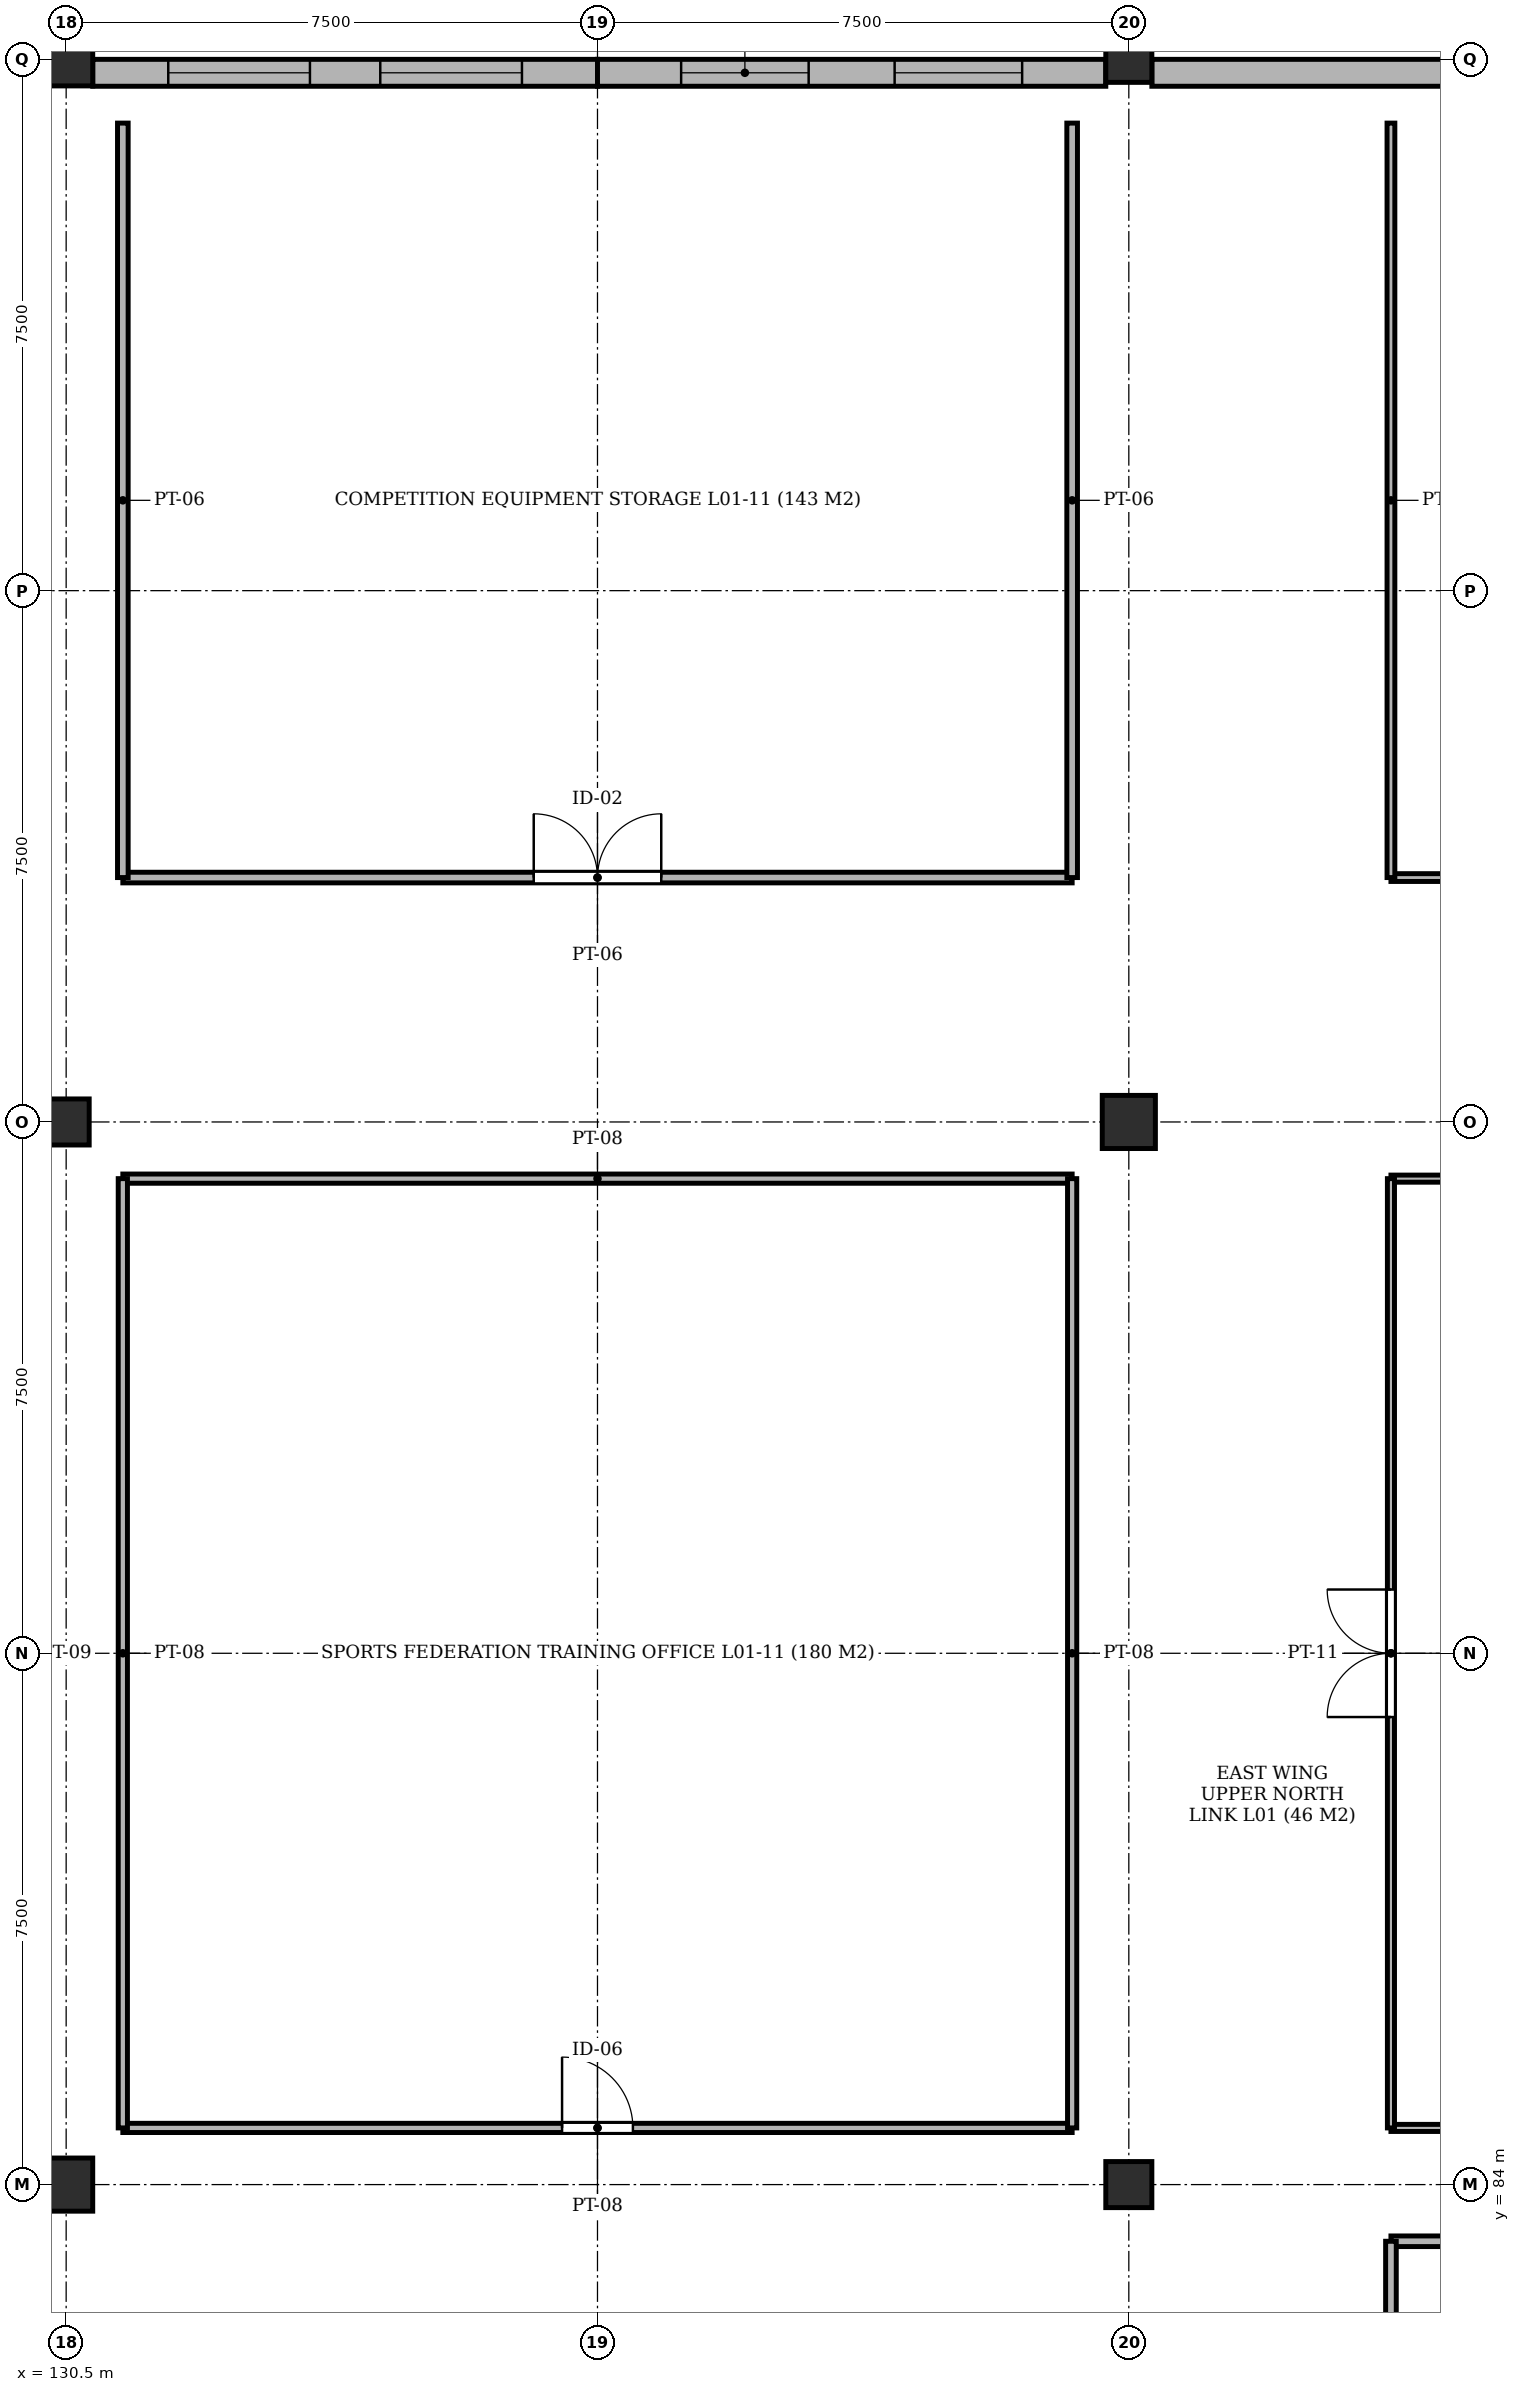
"""IFC4 building model, lengths in metres.
Left out: names, types, materials, properties, quantities, classifications, styles, units other than length and angle.
Written with IfcOpenShell. Run it as: python <this file> out.ifc"""

import sys

from ifc_helpers import new_model, si_unit, direction, frame, frame_2d, origin, origin_2d, place, context, subcontext, project, spatial, rectangle, extrude, element, fill, save


model = new_model("IFC4")
c1 = context("Model", 3, precision=1e-05, world=origin(), true_north=direction((0.0, 1.0)))
c2 = subcontext(c1, "Body", "Model", "MODEL_VIEW")
j1 = project(units=[si_unit("LENGTHUNIT", "METRE"), si_unit("PLANEANGLEUNIT", "RADIAN")], contexts=[c1])
p1 = place(None, origin())
s1 = spatial("IfcSite", under=j1, at=p1, CompositionType="ELEMENT")
p2 = place(p1, origin())
s2 = spatial("IfcBuilding", under=s1, at=p2, CompositionType="ELEMENT")
p3 = place(p2, frame((0.0, 0.0, 4.6)))
s3 = spatial("IfcBuildingStorey", under=s2, at=p3, CompositionType="ELEMENT", Elevation=4.6)
p4 = place(p3, frame((130.5, 84.0, -0.3), z_axis=(0.0, 0.0, 1.0), x_axis=(1.0, 0.0, 0.0)))
e1 = element("IfcColumn", 1, at=p4, inside=s3, PredefinedType="COLUMN", context=c2, shape_type="SweptSolid", body=[
    extrude(rectangle(XDim=0.75, YDim=0.75, at=origin_2d()), origin(), (0.0, 0.0, 1.0), 4.65),
])
p5 = place(p3, frame((130.5, 99.0, -0.3), z_axis=(0.0, 0.0, 1.0), x_axis=(1.0, 0.0, 0.0)))
e2 = element("IfcColumn", 2, at=p5, inside=s3, PredefinedType="COLUMN", context=c2, shape_type="SweptSolid", body=[
    extrude(rectangle(XDim=0.65, YDim=0.65, at=origin_2d()), origin(), (0.0, 0.0, 1.0), 4.65),
])
p6 = place(p3, frame((130.5, 114.0, -0.3), z_axis=(0.0, 0.0, 1.0), x_axis=(1.0, 0.0, 0.0)))
e3 = element("IfcColumn", 3, at=p6, inside=s3, PredefinedType="COLUMN", context=c2, shape_type="SweptSolid", body=[
    extrude(rectangle(XDim=0.75, YDim=0.75, at=origin_2d()), origin(), (0.0, 0.0, 1.0), 4.65),
])
p7 = place(p3, frame((145.5, 84.0, -0.3), z_axis=(0.0, 0.0, 1.0), x_axis=(1.0, 0.0, 0.0)))
e4 = element("IfcColumn", 4, at=p7, inside=s3, PredefinedType="COLUMN", context=c2, shape_type="SweptSolid", body=[
    extrude(rectangle(XDim=0.65, YDim=0.65, at=origin_2d()), origin(), (0.0, 0.0, 1.0), 4.65),
])
p8 = place(p3, frame((145.5, 99.0, -0.3), z_axis=(0.0, 0.0, 1.0), x_axis=(1.0, 0.0, 0.0)))
e5 = element("IfcColumn", 5, at=p8, inside=s3, PredefinedType="COLUMN", context=c2, shape_type="SweptSolid", body=[
    extrude(rectangle(XDim=0.75, YDim=0.75, at=origin_2d()), origin(), (0.0, 0.0, 1.0), 4.65),
])
p9 = place(p3, frame((145.5, 114.0, -0.3), z_axis=(0.0, 0.0, 1.0), x_axis=(1.0, 0.0, 0.0)))
e6 = element("IfcColumn", 6, at=p9, inside=s3, PredefinedType="COLUMN", context=c2, shape_type="SweptSolid", body=[
    extrude(rectangle(XDim=0.65, YDim=0.65, at=origin_2d()), origin(), (0.0, 0.0, 1.0), 4.65),
])
p10 = place(p3, frame((138.0, 113.81, 0.0), z_axis=(0.0, 0.0, 1.0), x_axis=(-1.0, 0.0, 0.0)))
e7 = element("IfcWall", 7, at=p10, inside=s3, PredefinedType="SOLIDWALL", context=c2, shape_type="SweptSolid", body=[
    extrude(rectangle(XDim=7.125, YDim=0.38, at=frame_2d((3.562, 0.0))), origin(), (0.0, 0.0, 1.0), 3.65),
])
p11 = place(p10, frame((4.059, 0.0, 0.92)))
e8 = element("IfcOpeningElement", 8, at=p11, cuts=e7, PredefinedType="OPENING", context=c2, shape_type="SweptSolid", body=[
    extrude(rectangle(XDim=2.0, YDim=2.3, at=frame_2d((1.0, 1.15))), frame((0.0, 0.202, 0.0), z_axis=(0.0, -1.0, 0.0), x_axis=(1.0, 0.0, 0.0)), (0.0, 0.0, 1.0), 0.404),
])
p12 = place(p10, frame((1.066, 0.0, 0.92)))
e9 = element("IfcOpeningElement", 9, at=p12, cuts=e7, PredefinedType="OPENING", context=c2, shape_type="SweptSolid", body=[
    extrude(rectangle(XDim=2.0, YDim=2.3, at=frame_2d((1.0, 1.15))), frame((0.0, 0.202, 0.0), z_axis=(0.0, -1.0, 0.0), x_axis=(1.0, 0.0, 0.0)), (0.0, 0.0, 1.0), 0.404),
])
p13 = place(p3, frame((145.175, 113.81, 0.0), z_axis=(0.0, 0.0, 1.0), x_axis=(-1.0, 0.0, 0.0)))
e10 = element("IfcWall", 10, at=p13, inside=s3, PredefinedType="SOLIDWALL", context=c2, shape_type="SweptSolid", body=[
    extrude(rectangle(XDim=7.175, YDim=0.38, at=frame_2d((3.587, 0.0))), origin(), (0.0, 0.0, 1.0), 3.65),
])
p14 = place(p13, frame((4.194, 0.0, 0.92)))
e11 = element("IfcOpeningElement", 11, at=p14, cuts=e10, PredefinedType="OPENING", context=c2, shape_type="SweptSolid", body=[
    extrude(rectangle(XDim=1.8, YDim=2.3, at=frame_2d((0.9, 1.15))), frame((0.0, 0.202, 0.0), z_axis=(0.0, -1.0, 0.0), x_axis=(1.0, 0.0, 0.0)), (0.0, 0.0, 1.0), 0.404),
])
p15 = place(p13, frame((1.181, 0.0, 0.92)))
e12 = element("IfcOpeningElement", 12, at=p15, cuts=e10, PredefinedType="OPENING", context=c2, shape_type="SweptSolid", body=[
    extrude(rectangle(XDim=1.8, YDim=2.3, at=frame_2d((0.9, 1.15))), frame((0.0, 0.202, 0.0), z_axis=(0.0, -1.0, 0.0), x_axis=(1.0, 0.0, 0.0)), (0.0, 0.0, 1.0), 0.404),
])
p16 = place(p3, frame((153.0, 113.81, 0.0), z_axis=(0.0, 0.0, 1.0), x_axis=(-1.0, 0.0, 0.0)))
e13 = element("IfcWall", 13, at=p16, inside=s3, PredefinedType="SOLIDWALL", context=c2, shape_type="SweptSolid", body=[
    extrude(rectangle(XDim=7.175, YDim=0.38, at=frame_2d((3.587, 0.0))), origin(), (0.0, 0.0, 1.0), 3.65),
])
p17 = place(p16, frame((1.081, 0.0, 0.92)))
e14 = element("IfcOpeningElement", 14, at=p17, cuts=e13, PredefinedType="OPENING", context=c2, shape_type="SweptSolid", body=[
    extrude(rectangle(XDim=2.0, YDim=2.3, at=frame_2d((1.0, 1.15))), frame((0.0, 0.202, 0.0), z_axis=(0.0, -1.0, 0.0), x_axis=(1.0, 0.0, 0.0)), (0.0, 0.0, 1.0), 0.404),
])
p18 = place(p3, frame((131.3, 84.8, 0.0), z_axis=(0.0, 0.0, 1.0), x_axis=(1.0, 0.0, 0.0)))
e15 = element("IfcWall", 15, at=p18, inside=s3, PredefinedType="PARTITIONING", context=c2, shape_type="SweptSolid", body=[
    extrude(rectangle(XDim=13.4, YDim=0.13, at=frame_2d((6.7, 0.0))), origin(), (0.0, 0.0, 1.0), 4.08),
])
p19 = place(p18, frame((6.2, 0.0, 0.0)))
e16 = element("IfcOpeningElement", 16, at=p19, cuts=e15, PredefinedType="OPENING", context=c2, shape_type="SweptSolid", body=[
    extrude(rectangle(XDim=1.0, YDim=2.15, at=frame_2d((0.5, 1.075))), frame((0.0, 0.077, 0.0), z_axis=(0.0, -1.0, 0.0), x_axis=(1.0, 0.0, 0.0)), (0.0, 0.0, 1.0), 0.154),
])
for number, where, z_axis, x_axis in (
    (17, (131.3, 98.2, 0.0), (0.0, 0.0, 1.0), (1.0, 0.0, 0.0)),
    (18, (131.3, 84.8, 0.0), (0.0, 0.0, 1.0), (0.0, 1.0, 0.0)),
    (19, (144.7, 84.8, 0.0), (0.0, 0.0, 1.0), (0.0, 1.0, 0.0)),
):
    element("IfcWall", number, at=place(p3, frame(where, z_axis=z_axis, x_axis=x_axis)), inside=s3, PredefinedType="PARTITIONING", context=c2, shape_type="SweptSolid", body=[
        extrude(rectangle(XDim=13.4, YDim=0.13, at=frame_2d((6.7, 0.0))), origin(), (0.0, 0.0, 1.0), 4.08),
    ])
p20 = place(p3, frame((131.3, 102.45, 0.0), z_axis=(0.0, 0.0, 1.0), x_axis=(1.0, 0.0, 0.0)))
e20 = element("IfcWall", 20, at=p20, inside=s3, PredefinedType="PARTITIONING", context=c2, shape_type="SweptSolid", body=[
    extrude(rectangle(XDim=13.4, YDim=0.15, at=frame_2d((6.7, 0.0))), origin(), (0.0, 0.0, 1.0), 4.08),
])
p21 = place(p20, frame((5.8, 0.0, 0.0)))
e21 = element("IfcOpeningElement", 21, at=p21, cuts=e20, PredefinedType="OPENING", context=c2, shape_type="SweptSolid", body=[
    extrude(rectangle(XDim=1.8, YDim=2.25, at=frame_2d((0.9, 1.125))), frame((0.0, 0.087, 0.0), z_axis=(0.0, -1.0, 0.0), x_axis=(1.0, 0.0, 0.0)), (0.0, 0.0, 1.0), 0.174),
])
for number, where, z_axis, x_axis in (
    (22, (131.3, 102.45, 0.0), (0.0, 0.0, 1.0), (0.0, 1.0, 0.0)),
    (23, (144.7, 102.45, 0.0), (0.0, 0.0, 1.0), (0.0, 1.0, 0.0)),
):
    element("IfcWall", number, at=place(p3, frame(where, z_axis=z_axis, x_axis=x_axis)), inside=s3, PredefinedType="PARTITIONING", context=c2, shape_type="SweptSolid", body=[
        extrude(rectangle(XDim=10.65, YDim=0.15, at=frame_2d((5.325, 0.0))), origin(), (0.0, 0.0, 1.0), 4.08),
    ])
p22 = place(p3, frame((149.2, 102.45, 0.0), z_axis=(0.0, 0.0, 1.0), x_axis=(1.0, 0.0, 0.0)))
e24 = element("IfcWall", 24, at=p22, inside=s3, PredefinedType="PARTITIONING", context=c2, shape_type="SweptSolid", body=[
    extrude(rectangle(XDim=17.6, YDim=0.11, at=frame_2d((8.8, 0.0))), origin(), (0.0, 0.0, 1.0), 4.08),
])
p23 = place(p22, frame((8.3, 0.0, 0.0)))
e25 = element("IfcOpeningElement", 25, at=p23, cuts=e24, PredefinedType="OPENING", context=c2, shape_type="SweptSolid", body=[
    extrude(rectangle(XDim=1.0, YDim=2.15, at=frame_2d((0.5, 1.075))), frame((0.0, 0.067, 0.0), z_axis=(0.0, -1.0, 0.0), x_axis=(1.0, 0.0, 0.0)), (0.0, 0.0, 1.0), 0.134),
])
p24 = place(p3, frame((149.2, 102.45, 0.0), z_axis=(0.0, 0.0, 1.0), x_axis=(0.0, 1.0, 0.0)))
e26 = element("IfcWall", 26, at=p24, inside=s3, PredefinedType="PARTITIONING", context=c2, shape_type="SweptSolid", body=[
    extrude(rectangle(XDim=10.65, YDim=0.11, at=frame_2d((5.325, 0.0))), origin(), (0.0, 0.0, 1.0), 4.08),
])
p25 = place(p3, frame((149.2, 83.2, 0.0), z_axis=(0.0, 0.0, 1.0), x_axis=(1.0, 0.0, 0.0)))
e27 = element("IfcWall", 27, at=p25, inside=s3, PredefinedType="PARTITIONING", context=c2, shape_type="SweptSolid", body=[
    extrude(rectangle(XDim=17.6, YDim=0.15, at=frame_2d((8.8, 0.0))), origin(), (0.0, 0.0, 1.0), 4.08),
])
p26 = place(p3, frame((149.2, 70.4, 0.0), z_axis=(0.0, 0.0, 1.0), x_axis=(0.0, 1.0, 0.0)))
e28 = element("IfcWall", 28, at=p26, inside=s3, PredefinedType="PARTITIONING", context=c2, shape_type="SweptSolid", body=[
    extrude(rectangle(XDim=12.8, YDim=0.15, at=frame_2d((6.4, 0.0))), origin(), (0.0, 0.0, 1.0), 4.08),
])
p27 = place(p26, frame((5.5, 0.0, 0.0)))
e29 = element("IfcOpeningElement", 29, at=p27, cuts=e28, PredefinedType="OPENING", context=c2, shape_type="SweptSolid", body=[
    extrude(rectangle(XDim=1.8, YDim=2.25, at=frame_2d((0.9, 1.125))), frame((0.0, 0.087, 0.0), z_axis=(0.0, -1.0, 0.0), x_axis=(1.0, 0.0, 0.0)), (0.0, 0.0, 1.0), 0.174),
])
for number, where, z_axis, x_axis in (
    (30, (149.2, 84.8, 0.0), (0.0, 0.0, 1.0), (1.0, 0.0, 0.0)),
    (31, (149.2, 98.2, 0.0), (0.0, 0.0, 1.0), (1.0, 0.0, 0.0)),
):
    element("IfcWall", number, at=place(p3, frame(where, z_axis=z_axis, x_axis=x_axis)), inside=s3, PredefinedType="PARTITIONING", context=c2, shape_type="SweptSolid", body=[
        extrude(rectangle(XDim=17.6, YDim=0.1, at=frame_2d((8.8, 0.0))), origin(), (0.0, 0.0, 1.0), 4.08),
    ])
p28 = place(p3, frame((149.2, 84.8, 0.0), z_axis=(0.0, 0.0, 1.0), x_axis=(0.0, 1.0, 0.0)))
e32 = element("IfcWall", 32, at=p28, inside=s3, PredefinedType="PARTITIONING", context=c2, shape_type="SweptSolid", body=[
    extrude(rectangle(XDim=13.4, YDim=0.1, at=frame_2d((6.7, 0.0))), origin(), (0.0, 0.0, 1.0), 4.08),
])
p29 = place(p28, frame((5.8, 0.0, 0.0)))
e33 = element("IfcOpeningElement", 33, at=p29, cuts=e32, PredefinedType="OPENING", context=c2, shape_type="SweptSolid", body=[
    extrude(rectangle(XDim=1.8, YDim=2.25, at=frame_2d((0.9, 1.125))), frame((0.0, 0.062, 0.0), z_axis=(0.0, -1.0, 0.0), x_axis=(1.0, 0.0, 0.0)), (0.0, 0.0, 1.0), 0.124),
])
p30 = place(p11, origin())
e34 = element("IfcWindow", 34, at=p30, inside=s3, PartitioningType="SINGLE_PANEL", PredefinedType="WINDOW", context=c2, shape_type="SweptSolid", body=[
    extrude(rectangle(XDim=2.0, YDim=2.3, at=frame_2d((1.0, 1.15))), frame((0.0, 0.03, 0.0), z_axis=(0.0, -1.0, 0.0), x_axis=(1.0, 0.0, 0.0)), (0.0, 0.0, 1.0), 0.06),
])
fill(e8, e34)
p31 = place(p12, origin())
e35 = element("IfcWindow", 35, at=p31, inside=s3, PartitioningType="SINGLE_PANEL", PredefinedType="WINDOW", context=c2, shape_type="SweptSolid", body=[
    extrude(rectangle(XDim=2.0, YDim=2.3, at=frame_2d((1.0, 1.15))), frame((0.0, 0.03, 0.0), z_axis=(0.0, -1.0, 0.0), x_axis=(1.0, 0.0, 0.0)), (0.0, 0.0, 1.0), 0.06),
])
fill(e9, e35)
p32 = place(p14, origin())
e36 = element("IfcWindow", 36, at=p32, inside=s3, PartitioningType="SINGLE_PANEL", PredefinedType="WINDOW", context=c2, shape_type="SweptSolid", body=[
    extrude(rectangle(XDim=1.8, YDim=2.3, at=frame_2d((0.9, 1.15))), frame((0.0, 0.03, 0.0), z_axis=(0.0, -1.0, 0.0), x_axis=(1.0, 0.0, 0.0)), (0.0, 0.0, 1.0), 0.06),
])
fill(e11, e36)
p33 = place(p15, origin())
e37 = element("IfcWindow", 37, at=p33, inside=s3, PartitioningType="SINGLE_PANEL", PredefinedType="WINDOW", context=c2, shape_type="SweptSolid", body=[
    extrude(rectangle(XDim=1.8, YDim=2.3, at=frame_2d((0.9, 1.15))), frame((0.0, 0.03, 0.0), z_axis=(0.0, -1.0, 0.0), x_axis=(1.0, 0.0, 0.0)), (0.0, 0.0, 1.0), 0.06),
])
fill(e12, e37)
p34 = place(p19, origin())
e38 = element("IfcDoor", 38, at=p34, inside=s3, OperationType="SINGLE_SWING_LEFT", PredefinedType="DOOR", context=c2, shape_type="SweptSolid", body=[
    extrude(rectangle(XDim=1.0, YDim=2.15, at=frame_2d((0.5, 1.075))), frame((0.0, 0.025, 0.0), z_axis=(0.0, -1.0, 0.0), x_axis=(1.0, 0.0, 0.0)), (0.0, 0.0, 1.0), 0.05),
])
fill(e16, e38)
p35 = place(p21, origin())
e39 = element("IfcDoor", 39, at=p35, inside=s3, OperationType="DOUBLE_DOOR_SINGLE_SWING", PredefinedType="DOOR", context=c2, shape_type="SweptSolid", body=[
    extrude(rectangle(XDim=1.8, YDim=2.25, at=frame_2d((0.9, 1.125))), frame((0.0, 0.025, 0.0), z_axis=(0.0, -1.0, 0.0), x_axis=(1.0, 0.0, 0.0)), (0.0, 0.0, 1.0), 0.05),
])
fill(e21, e39)
p36 = place(p29, origin())
e40 = element("IfcDoor", 40, at=p36, inside=s3, OperationType="DOUBLE_DOOR_SINGLE_SWING", PredefinedType="DOOR", context=c2, shape_type="SweptSolid", body=[
    extrude(rectangle(XDim=1.8, YDim=2.25, at=frame_2d((0.9, 1.125))), frame((0.0, 0.025, 0.0), z_axis=(0.0, -1.0, 0.0), x_axis=(1.0, 0.0, 0.0)), (0.0, 0.0, 1.0), 0.05),
])
fill(e33, e40)
save(model, sys.argv[1])
